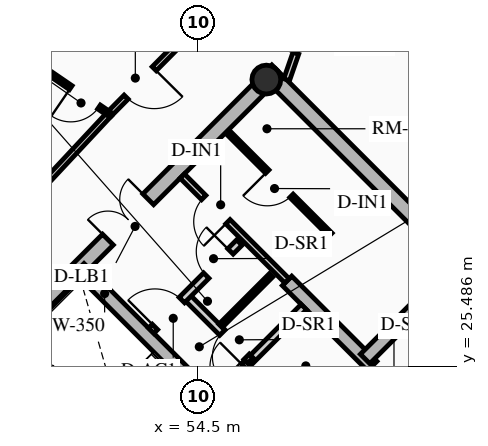
"""IFC4 building model, lengths in metres.
Left out: names, types, materials, properties, quantities, classifications, styles, units other than length and angle.
Written with IfcOpenShell. Run it as: python <this file> out.ifc"""

import sys

from ifc_helpers import new_model, si_unit, direction, frame, frame_2d, origin, origin_2d, place, context, subcontext, project, spatial, rectangle, hollow_circle, extrude, source, transform, mapped, element, fill, save


model = new_model("IFC4")
c1 = context("Model", 3, precision=1e-05, world=origin(), true_north=direction((0.0, 1.0)))
c2 = subcontext(c1, "Body", "Model", "MODEL_VIEW")
j1 = project(units=[si_unit("LENGTHUNIT", "METRE"), si_unit("PLANEANGLEUNIT", "RADIAN")], contexts=[c1])
p1 = place(None, origin())
s1 = spatial("IfcSite", under=j1, at=p1, CompositionType="ELEMENT")
p2 = place(p1, origin())
s2 = spatial("IfcBuilding", under=s1, at=p2, CompositionType="ELEMENT")
p3 = place(p2, frame((0.0, 0.0, 154.51)))
s3 = spatial("IfcBuildingStorey", under=s2, at=p3, CompositionType="ELEMENT", Elevation=154.51)
for number, where, z_axis, x_axis in (
    (1, (58.702, 15.732, 0.0), (0.0, 0.0, 1.0), (-0.707, 0.707, 0.0)),
    (2, (66.268, 23.298, 0.0), (0.0, 0.0, 1.0), (-0.707, 0.707, 0.0)),
):
    element("IfcWall", number, at=place(p3, frame(where, z_axis=z_axis, x_axis=x_axis)), inside=s3, PredefinedType="SHEAR", context=c2, shape_type="SweptSolid", body=[
        extrude(rectangle(XDim=14.1, YDim=0.4, at=frame_2d((7.05, 0.0))), origin(), (0.0, 0.0, 1.0), 2.91),
    ])
p4 = place(p3, frame((48.873, 25.561, 0.0), z_axis=(0.0, 0.0, 1.0), x_axis=(0.707106781187, 0.707106781187, 0.0)))
e3 = element("IfcWall", 3, at=p4, inside=s3, PredefinedType="SHEAR", context=c2, shape_type="SweptSolid", body=[
    extrude(rectangle(XDim=10.7, YDim=0.4, at=frame_2d((5.35, 0.0))), origin(), (0.0, 0.0, 1.0), 2.91),
])
m1 = source(origin(), c2, "Body", "SweptSolid", [
    extrude(rectangle(XDim=1.5, YDim=2.02, at=frame_2d((0.75, 1.01))), frame((0.0, 0.21, 0.0), z_axis=(0.0, -1.0, 0.0), x_axis=(1.0, 0.0, 0.0)), (0.0, 0.0, 1.0), 0.42),
])
p5 = place(p4, frame((4.6, 0.0, 0.0)))
e4 = element("IfcOpeningElement", 4, at=p5, cuts=e3, PredefinedType="OPENING", context=c2, shape_type="MappedRepresentation", body=[
    mapped(m1, transform((0.0, 0.0, 0.0), x_axis=(1.0, 0.0, 0.0), y_axis=(0.0, 1.0, 0.0), z_axis=(0.0, 0.0, 1.0), scale=1.0)),
])
p6 = place(p3, frame((61.06, 18.373, 0.0), z_axis=(0.0, 0.0, 1.0), x_axis=(-0.707106781187, 0.707106781187, 0.0)))
e5 = element("IfcWall", 5, at=p6, inside=s3, PredefinedType="SHEAR", context=c2, shape_type="SweptSolid", body=[
    extrude(rectangle(XDim=13.7, YDim=0.35, at=frame_2d((6.85, 0.0))), origin(), (0.0, 0.0, 1.0), 2.91),
])
m2 = source(origin(), c2, "Body", "SweptSolid", [
    extrude(rectangle(XDim=1.1, YDim=2.015, at=frame_2d((0.55, 1.007))), frame((0.0, 0.185, 0.0), z_axis=(0.0, -1.0, 0.0), x_axis=(1.0, 0.0, 0.0)), (0.0, 0.0, 1.0), 0.37),
])
p7 = place(p6, frame((4.85, 0.0, 0.0)))
e6 = element("IfcOpeningElement", 6, at=p7, cuts=e5, PredefinedType="OPENING", context=c2, shape_type="MappedRepresentation", body=[
    mapped(m2, transform((0.0, 0.0, 0.0), x_axis=(1.0, 0.0, 0.0), y_axis=(0.0, 1.0, 0.0), z_axis=(0.0, 0.0, 1.0), scale=1.0)),
])
p8 = place(p6, frame((0.625, 0.0, 0.0)))
e7 = element("IfcOpeningElement", 7, at=p8, cuts=e5, PredefinedType="OPENING", context=c2, shape_type="MappedRepresentation", body=[
    mapped(m2, transform((0.0, 0.0, 0.0), x_axis=(1.0, 0.0, 0.0), y_axis=(0.0, 1.0, 0.0), z_axis=(0.0, 0.0, 1.0), scale=1.0)),
])
p9 = place(p6, frame((2.625, 0.0, 0.0)))
e8 = element("IfcOpeningElement", 8, at=p9, cuts=e5, PredefinedType="OPENING", context=c2, shape_type="MappedRepresentation", body=[
    mapped(m2, transform((0.0, 0.0, 0.0), x_axis=(1.0, 0.0, 0.0), y_axis=(0.0, 1.0, 0.0), z_axis=(0.0, 0.0, 1.0), scale=1.0)),
])
m3 = source(origin(), c2, "Body", "SweptSolid", [
    extrude(rectangle(XDim=1.15, YDim=2.02, at=frame_2d((0.575, 1.01))), frame((0.0, 0.185, 0.0), z_axis=(0.0, -1.0, 0.0), x_axis=(1.0, 0.0, 0.0)), (0.0, 0.0, 1.0), 0.37),
])
p10 = place(p6, frame((7.27, 0.0, 0.0)))
e9 = element("IfcOpeningElement", 9, at=p10, cuts=e5, PredefinedType="OPENING", context=c2, shape_type="MappedRepresentation", body=[
    mapped(m3, transform((0.0, 0.0, 0.0), x_axis=(1.0, 0.0, 0.0), y_axis=(0.0, 1.0, 0.0), z_axis=(0.0, 0.0, 1.0), scale=1.0)),
])
p11 = place(p3, frame((63.627, 20.94, 0.0), z_axis=(0.0, 0.0, 1.0), x_axis=(-0.707119496762, 0.707094065383, 0.0)))
e10 = element("IfcWall", 10, at=p11, inside=s3, PredefinedType="SHEAR", context=c2, shape_type="SweptSolid", body=[
    extrude(rectangle(XDim=9.6, YDim=0.35, at=frame_2d((4.8, 0.0))), origin(), (0.0, 0.0, 1.0), 2.91),
])
p12 = place(p11, frame((5.28, 0.0, 0.0)))
e11 = element("IfcOpeningElement", 11, at=p12, cuts=e10, PredefinedType="OPENING", context=c2, shape_type="MappedRepresentation", body=[
    mapped(m3, transform((0.0, 0.0, 0.0), x_axis=(1.0, 0.0, 0.0), y_axis=(0.0, 1.0, 0.0), z_axis=(0.0, 0.0, 1.0), scale=1.0)),
])
p13 = place(p3, frame((53.922, 21.141, 0.0), z_axis=(0.0, 0.0, 1.0), x_axis=(-0.707106781187, 0.707106781187, 0.0)))
e12 = element("IfcWall", 12, at=p13, inside=s3, PredefinedType="SHEAR", context=c2, shape_type="SweptSolid", body=[
    extrude(rectangle(XDim=6.695, YDim=0.35, at=frame_2d((3.348, 0.0))), origin(), (0.0, 0.0, 1.0), 2.91),
])
p14 = place(p3, frame((58.893, 25.674, 0.0), z_axis=(0.0, 0.0, 1.0), x_axis=(0.707106781187, 0.707106781187, 0.0)))
e13 = element("IfcWall", 13, at=p14, inside=s3, PredefinedType="SHEAR", context=c2, shape_type="SweptSolid", body=[
    extrude(rectangle(XDim=3.285, YDim=0.35, at=frame_2d((1.643, 0.0))), origin(), (0.0, 0.0, 1.0), 2.91),
])
p15 = place(p3, frame((56.294, 33.024, 0.0), z_axis=(0.0, 0.0, 1.0), x_axis=(0.707106781187, 0.707106781187, 0.0)))
e14 = element("IfcColumn", 14, at=p15, inside=s3, PredefinedType="COLUMN", context=c2, shape_type="SweptSolid", body=[
    extrude(hollow_circle(Radius=0.38, WallThickness=0.032, at=origin_2d()), origin(), (0.0, 0.0, 1.0), 2.91),
])
p16 = place(p3, frame((54.961, 24.719, 0.0), z_axis=(0.0, 0.0, 1.0), x_axis=(0.707106781187, 0.707106781187, 0.0)))
e15 = element("IfcWall", 15, at=p16, inside=s3, PredefinedType="PARTITIONING", context=c2, shape_type="SweptSolid", body=[
    extrude(rectangle(XDim=3.28, YDim=0.2, at=frame_2d((1.64, 0.0))), origin(), (0.0, 0.0, 1.0), 2.675),
])
m4 = source(origin(), c2, "Body", "SweptSolid", [
    extrude(rectangle(XDim=0.9, YDim=2.005, at=frame_2d((0.45, 1.002))), frame((0.0, 0.11, 0.0), z_axis=(0.0, -1.0, 0.0), x_axis=(1.0, 0.0, 0.0)), (0.0, 0.0, 1.0), 0.22),
])
p17 = place(p16, frame((0.16, 0.0, 0.0)))
e16 = element("IfcOpeningElement", 16, at=p17, cuts=e15, PredefinedType="OPENING", context=c2, shape_type="MappedRepresentation", body=[
    mapped(m4, transform((0.0, 0.0, 0.0), x_axis=(1.0, 0.0, 0.0), y_axis=(0.0, 1.0, 0.0), z_axis=(0.0, 0.0, 1.0), scale=1.0)),
])
p18 = place(p3, frame((55.874, 25.631, 0.0), z_axis=(0.0, 0.0, 1.0), x_axis=(-0.707157639372, 0.707055919343, 0.0)))
e17 = element("IfcWall", 17, at=p18, inside=s3, PredefinedType="PARTITIONING", context=c2, shape_type="SweptSolid", body=[
    extrude(rectangle(XDim=2.4, YDim=0.2, at=frame_2d((1.2, 0.0))), origin(), (0.0, 0.0, 1.0), 2.675),
])
p19 = place(p18, frame((0.14, 0.0, 0.0)))
e18 = element("IfcOpeningElement", 18, at=p19, cuts=e17, PredefinedType="OPENING", context=c2, shape_type="MappedRepresentation", body=[
    mapped(m4, transform((0.0, 0.0, 0.0), x_axis=(1.0, 0.0, 0.0), y_axis=(0.0, 1.0, 0.0), z_axis=(0.0, 0.0, 1.0), scale=1.0)),
])
p20 = place(p3, frame((53.264, 26.416, 0.0), z_axis=(0.0, 0.0, 1.0), x_axis=(0.707106781187, 0.707106781187, 0.0)))
e19 = element("IfcWall", 19, at=p20, inside=s3, PredefinedType="PARTITIONING", context=c2, shape_type="SweptSolid", body=[
    extrude(rectangle(XDim=3.28, YDim=0.2, at=frame_2d((1.64, 0.0))), origin(), (0.0, 0.0, 1.0), 2.675),
])
m5 = source(origin(), c2, "Body", "SweptSolid", [
    extrude(rectangle(XDim=1.0, YDim=2.015, at=frame_2d((0.5, 1.007))), frame((0.0, 0.11, 0.0), z_axis=(0.0, -1.0, 0.0), x_axis=(1.0, 0.0, 0.0)), (0.0, 0.0, 1.0), 0.22),
])
p21 = place(p20, frame((0.14, 0.0, 0.0)))
e20 = element("IfcOpeningElement", 20, at=p21, cuts=e19, PredefinedType="OPENING", context=c2, shape_type="MappedRepresentation", body=[
    mapped(m5, transform((0.0, 0.0, 0.0), x_axis=(1.0, 0.0, 0.0), y_axis=(0.0, 1.0, 0.0), z_axis=(0.0, 0.0, 1.0), scale=1.0)),
])
p22 = place(p20, frame((2.05, 0.0, 0.0)))
e21 = element("IfcOpeningElement", 21, at=p22, cuts=e19, PredefinedType="OPENING", context=c2, shape_type="MappedRepresentation", body=[
    mapped(m4, transform((0.0, 0.0, 0.0), x_axis=(1.0, 0.0, 0.0), y_axis=(0.0, 1.0, 0.0), z_axis=(0.0, 0.0, 1.0), scale=1.0)),
])
p23 = place(p3, frame((55.089, 26.543, 0.0), z_axis=(0.0, 0.0, 1.0), x_axis=(0.707106781187, 0.707106781187, 0.0)))
e22 = element("IfcWall", 22, at=p23, inside=s3, PredefinedType="PARTITIONING", context=c2, shape_type="SweptSolid", body=[
    extrude(rectangle(XDim=1.88, YDim=0.125, at=frame_2d((0.94, 0.0))), origin(), (0.0, 0.0, 1.0), 2.675),
])
p24 = place(p3, frame((56.839, 27.728, 0.0), z_axis=(0.0, 0.0, 1.0), x_axis=(-0.707106781187, 0.707106781187, 0.0)))
e23 = element("IfcWall", 23, at=p24, inside=s3, PredefinedType="PARTITIONING", context=c2, shape_type="SweptSolid", body=[
    extrude(rectangle(XDim=3.9, YDim=0.16, at=frame_2d((1.95, 0.0))), origin(), (0.0, 0.0, 1.0), 2.675),
])
m6 = source(origin(), c2, "Body", "SweptSolid", [
    extrude(rectangle(XDim=0.9, YDim=2.005, at=frame_2d((0.45, 1.002))), frame((0.0, 0.09, 0.0), z_axis=(0.0, -1.0, 0.0), x_axis=(1.0, 0.0, 0.0)), (0.0, 0.0, 1.0), 0.18),
])
p25 = place(p24, frame((2.2, 0.0, 0.0)))
e24 = element("IfcOpeningElement", 24, at=p25, cuts=e23, PredefinedType="OPENING", context=c2, shape_type="MappedRepresentation", body=[
    mapped(m6, transform((0.0, 0.0, 0.0), x_axis=(1.0, 0.0, 0.0), y_axis=(0.0, 1.0, 0.0), z_axis=(0.0, 0.0, 1.0), scale=1.0)),
])
p26 = place(p3, frame((57.981, 28.941, 0.0), z_axis=(0.0, 0.0, 1.0), x_axis=(-0.707074823725, 0.707138737204, 0.0)))
e25 = element("IfcWall", 25, at=p26, inside=s3, PredefinedType="PARTITIONING", context=c2, shape_type="SweptSolid", body=[
    extrude(rectangle(XDim=3.82, YDim=0.125, at=frame_2d((1.91, 0.0))), origin(), (0.0, 0.0, 1.0), 2.675),
])
m7 = source(origin(), c2, "Body", "SweptSolid", [
    extrude(rectangle(XDim=0.9, YDim=2.005, at=frame_2d((0.45, 1.002))), frame((0.0, 0.073, 0.0), z_axis=(0.0, -1.0, 0.0), x_axis=(1.0, 0.0, 0.0)), (0.0, 0.0, 1.0), 0.145),
])
p27 = place(p26, frame((1.45, 0.0, 0.0)))
e26 = element("IfcOpeningElement", 26, at=p27, cuts=e25, PredefinedType="OPENING", context=c2, shape_type="MappedRepresentation", body=[
    mapped(m7, transform((0.0, 0.0, 0.0), x_axis=(1.0, 0.0, 0.0), y_axis=(0.0, 1.0, 0.0), z_axis=(0.0, 0.0, 1.0), scale=1.0)),
])
p28 = place(p3, frame((54.501, 34.479, 0.0), z_axis=(0.0, 0.0, 1.0), x_axis=(-0.70346073929, -0.710734119258, 0.0)))
e27 = element("IfcWall", 27, at=p28, inside=s3, PredefinedType="PARTITIONING", context=c2, shape_type="SweptSolid", body=[
    extrude(rectangle(XDim=3.323, YDim=0.15, at=frame_2d((1.662, 0.0))), origin(), (0.0, 0.0, 1.0), 2.245),
])
m8 = source(origin(), c2, "Body", "SweptSolid", [
    extrude(rectangle(XDim=1.05, YDim=2.015, at=frame_2d((0.525, 1.007))), frame((0.0, 0.085, 0.0), z_axis=(0.0, -1.0, 0.0), x_axis=(1.0, 0.0, 0.0)), (0.0, 0.0, 1.0), 0.17),
])
p29 = place(p28, frame((1.645, 0.0, 0.0)))
e28 = element("IfcOpeningElement", 28, at=p29, cuts=e27, PredefinedType="OPENING", context=c2, shape_type="MappedRepresentation", body=[
    mapped(m8, transform((0.0, 0.0, 0.0), x_axis=(1.0, 0.0, 0.0), y_axis=(0.0, 1.0, 0.0), z_axis=(0.0, 0.0, 1.0), scale=1.0)),
])
p30 = place(p3, frame((52.163, 32.117, 0.0), z_axis=(0.0, 0.0, 1.0), x_axis=(-0.682485296115, -0.730899323154, 0.0)))
e29 = element("IfcWall", 29, at=p30, inside=s3, PredefinedType="PARTITIONING", context=c2, shape_type="SweptSolid", body=[
    extrude(rectangle(XDim=6.404, YDim=0.15, at=frame_2d((3.202, 0.0))), origin(), (0.0, 0.0, 1.0), 2.245),
])
p31 = place(p3, frame((56.828, 33.021, 0.0), z_axis=(0.0, 0.0, 1.0), x_axis=(0.328682472103, 0.944440486496, 0.0)))
e30 = element("IfcWall", 30, at=p31, inside=s3, PredefinedType="PARTITIONING", context=c2, shape_type="SweptSolid", body=[
    extrude(rectangle(XDim=1.989, YDim=0.16, at=frame_2d((0.995, 0.0))), origin(), (0.0, 0.0, 1.0), 2.245),
])
m9 = source(origin(), c2, "Body", "SweptSolid", [
    extrude(rectangle(XDim=1.05, YDim=2.015, at=frame_2d((0.525, 1.007))), frame((0.0, 0.09, 0.0), z_axis=(0.0, -1.0, 0.0), x_axis=(1.0, 0.0, 0.0)), (0.0, 0.0, 1.0), 0.18),
])
p32 = place(p31, frame((0.739, 0.0, 0.0)))
e31 = element("IfcOpeningElement", 31, at=p32, cuts=e30, PredefinedType="OPENING", context=c2, shape_type="MappedRepresentation", body=[
    mapped(m9, transform((0.0, 0.0, 0.0), x_axis=(1.0, 0.0, 0.0), y_axis=(0.0, 1.0, 0.0), z_axis=(0.0, 0.0, 1.0), scale=1.0)),
])
p33 = place(p3, frame((52.163, 32.117, 0.0), z_axis=(0.0, 0.0, 1.0), x_axis=(-0.825403853282, 0.564542716707, 0.0)))
e32 = element("IfcWall", 32, at=p33, inside=s3, PredefinedType="PARTITIONING", context=c2, shape_type="SweptSolid", body=[
    extrude(rectangle(XDim=8.74, YDim=0.125, at=frame_2d((4.37, 0.0))), origin(), (0.0, 0.0, 1.0), 2.245),
])
p34 = place(p33, frame((0.33, 0.0, 0.0)))
e33 = element("IfcOpeningElement", 33, at=p34, cuts=e32, PredefinedType="OPENING", context=c2, shape_type="MappedRepresentation", body=[
    mapped(m7, transform((0.0, 0.0, 0.0), x_axis=(1.0, 0.0, 0.0), y_axis=(0.0, 1.0, 0.0), z_axis=(0.0, 0.0, 1.0), scale=1.0)),
])
m10 = source(origin(), c2, "Body", "SweptSolid", [
    extrude(rectangle(XDim=1.15, YDim=2.02, at=frame_2d((0.575, 1.01))), frame((0.0, 0.025, 0.0), z_axis=(0.0, -1.0, 0.0), x_axis=(1.0, 0.0, 0.0)), (0.0, 0.0, 1.0), 0.05),
])
p35 = place(p12, origin())
e34 = element("IfcDoor", 34, at=p35, inside=s3, OperationType="SINGLE_SWING_LEFT", PredefinedType="DOOR", context=c2, shape_type="MappedRepresentation", body=[
    mapped(m10, transform((0.0, 0.0, 0.0), x_axis=(1.0, 0.0, 0.0), y_axis=(0.0, 1.0, 0.0), z_axis=(0.0, 0.0, 1.0), scale=1.0)),
])
fill(e11, e34)
m11 = source(origin(), c2, "Body", "SweptSolid", [
    extrude(rectangle(XDim=1.5, YDim=2.02, at=frame_2d((0.75, 1.01))), frame((0.0, 0.025, 0.0), z_axis=(0.0, -1.0, 0.0), x_axis=(1.0, 0.0, 0.0)), (0.0, 0.0, 1.0), 0.05),
])
p36 = place(p5, origin())
e35 = element("IfcDoor", 35, at=p36, inside=s3, OperationType="DOUBLE_DOOR_SINGLE_SWING", PredefinedType="DOOR", context=c2, shape_type="MappedRepresentation", body=[
    mapped(m11, transform((0.0, 0.0, 0.0), x_axis=(1.0, 0.0, 0.0), y_axis=(0.0, 1.0, 0.0), z_axis=(0.0, 0.0, 1.0), scale=1.0)),
])
fill(e4, e35)
m12 = source(origin(), c2, "Body", "SweptSolid", [
    extrude(rectangle(XDim=0.9, YDim=2.005, at=frame_2d((0.45, 1.002))), frame((0.0, 0.025, 0.0), z_axis=(0.0, -1.0, 0.0), x_axis=(1.0, 0.0, 0.0)), (0.0, 0.0, 1.0), 0.05),
])
p37 = place(p17, origin())
e36 = element("IfcDoor", 36, at=p37, inside=s3, OperationType="SINGLE_SWING_RIGHT", PredefinedType="DOOR", context=c2, shape_type="MappedRepresentation", body=[
    mapped(m12, transform((0.0, 0.0, 0.0), x_axis=(1.0, 0.0, 0.0), y_axis=(0.0, 1.0, 0.0), z_axis=(0.0, 0.0, 1.0), scale=1.0)),
])
fill(e16, e36)
m13 = source(origin(), c2, "Body", "SweptSolid", [
    extrude(rectangle(XDim=1.0, YDim=2.015, at=frame_2d((0.5, 1.007))), frame((0.0, 0.025, 0.0), z_axis=(0.0, -1.0, 0.0), x_axis=(1.0, 0.0, 0.0)), (0.0, 0.0, 1.0), 0.05),
])
p38 = place(p21, origin())
e37 = element("IfcDoor", 37, at=p38, inside=s3, OperationType="SINGLE_SWING_LEFT", PredefinedType="DOOR", context=c2, shape_type="MappedRepresentation", body=[
    mapped(m13, transform((0.0, 0.0, 0.0), x_axis=(1.0, 0.0, 0.0), y_axis=(0.0, 1.0, 0.0), z_axis=(0.0, 0.0, 1.0), scale=1.0)),
])
fill(e20, e37)
p39 = place(p19, origin())
e38 = element("IfcDoor", 38, at=p39, inside=s3, OperationType="SINGLE_SWING_LEFT", PredefinedType="DOOR", context=c2, shape_type="MappedRepresentation", body=[
    mapped(m12, transform((0.0, 0.0, 0.0), x_axis=(1.0, 0.0, 0.0), y_axis=(0.0, 1.0, 0.0), z_axis=(0.0, 0.0, 1.0), scale=1.0)),
])
fill(e18, e38)
p40 = place(p22, origin())
e39 = element("IfcDoor", 39, at=p40, inside=s3, OperationType="SINGLE_SWING_RIGHT", PredefinedType="DOOR", context=c2, shape_type="MappedRepresentation", body=[
    mapped(m12, transform((0.0, 0.0, 0.0), x_axis=(1.0, 0.0, 0.0), y_axis=(0.0, 1.0, 0.0), z_axis=(0.0, 0.0, 1.0), scale=1.0)),
])
fill(e21, e39)
p41 = place(p25, origin())
e40 = element("IfcDoor", 40, at=p41, inside=s3, OperationType="SINGLE_SWING_LEFT", PredefinedType="DOOR", context=c2, shape_type="MappedRepresentation", body=[
    mapped(m12, transform((0.0, 0.0, 0.0), x_axis=(1.0, 0.0, 0.0), y_axis=(0.0, 1.0, 0.0), z_axis=(0.0, 0.0, 1.0), scale=1.0)),
])
fill(e24, e40)
p42 = place(p27, origin())
e41 = element("IfcDoor", 41, at=p42, inside=s3, OperationType="SINGLE_SWING_RIGHT", PredefinedType="DOOR", context=c2, shape_type="MappedRepresentation", body=[
    mapped(m12, transform((0.0, 0.0, 0.0), x_axis=(1.0, 0.0, 0.0), y_axis=(0.0, 1.0, 0.0), z_axis=(0.0, 0.0, 1.0), scale=1.0)),
])
fill(e26, e41)
m14 = source(origin(), c2, "Body", "SweptSolid", [
    extrude(rectangle(XDim=1.05, YDim=2.015, at=frame_2d((0.525, 1.007))), frame((0.0, 0.025, 0.0), z_axis=(0.0, -1.0, 0.0), x_axis=(1.0, 0.0, 0.0)), (0.0, 0.0, 1.0), 0.05),
])
p43 = place(p32, origin())
e42 = element("IfcDoor", 42, at=p43, inside=s3, OperationType="SINGLE_SWING_LEFT", PredefinedType="DOOR", context=c2, shape_type="MappedRepresentation", body=[
    mapped(m14, transform((0.0, 0.0, 0.0), x_axis=(1.0, 0.0, 0.0), y_axis=(0.0, 1.0, 0.0), z_axis=(0.0, 0.0, 1.0), scale=1.0)),
])
fill(e31, e42)
p44 = place(p29, origin())
e43 = element("IfcDoor", 43, at=p44, inside=s3, OperationType="SINGLE_SWING_LEFT", PredefinedType="DOOR", context=c2, shape_type="MappedRepresentation", body=[
    mapped(m14, transform((0.0, 0.0, 0.0), x_axis=(1.0, 0.0, 0.0), y_axis=(0.0, 1.0, 0.0), z_axis=(0.0, 0.0, 1.0), scale=1.0)),
])
fill(e28, e43)
p45 = place(p34, origin())
e44 = element("IfcDoor", 44, at=p45, inside=s3, OperationType="SINGLE_SWING_RIGHT", PredefinedType="DOOR", context=c2, shape_type="MappedRepresentation", body=[
    mapped(m12, transform((0.0, 0.0, 0.0), x_axis=(1.0, 0.0, 0.0), y_axis=(0.0, 1.0, 0.0), z_axis=(0.0, 0.0, 1.0), scale=1.0)),
])
fill(e33, e44)
save(model, sys.argv[1])
